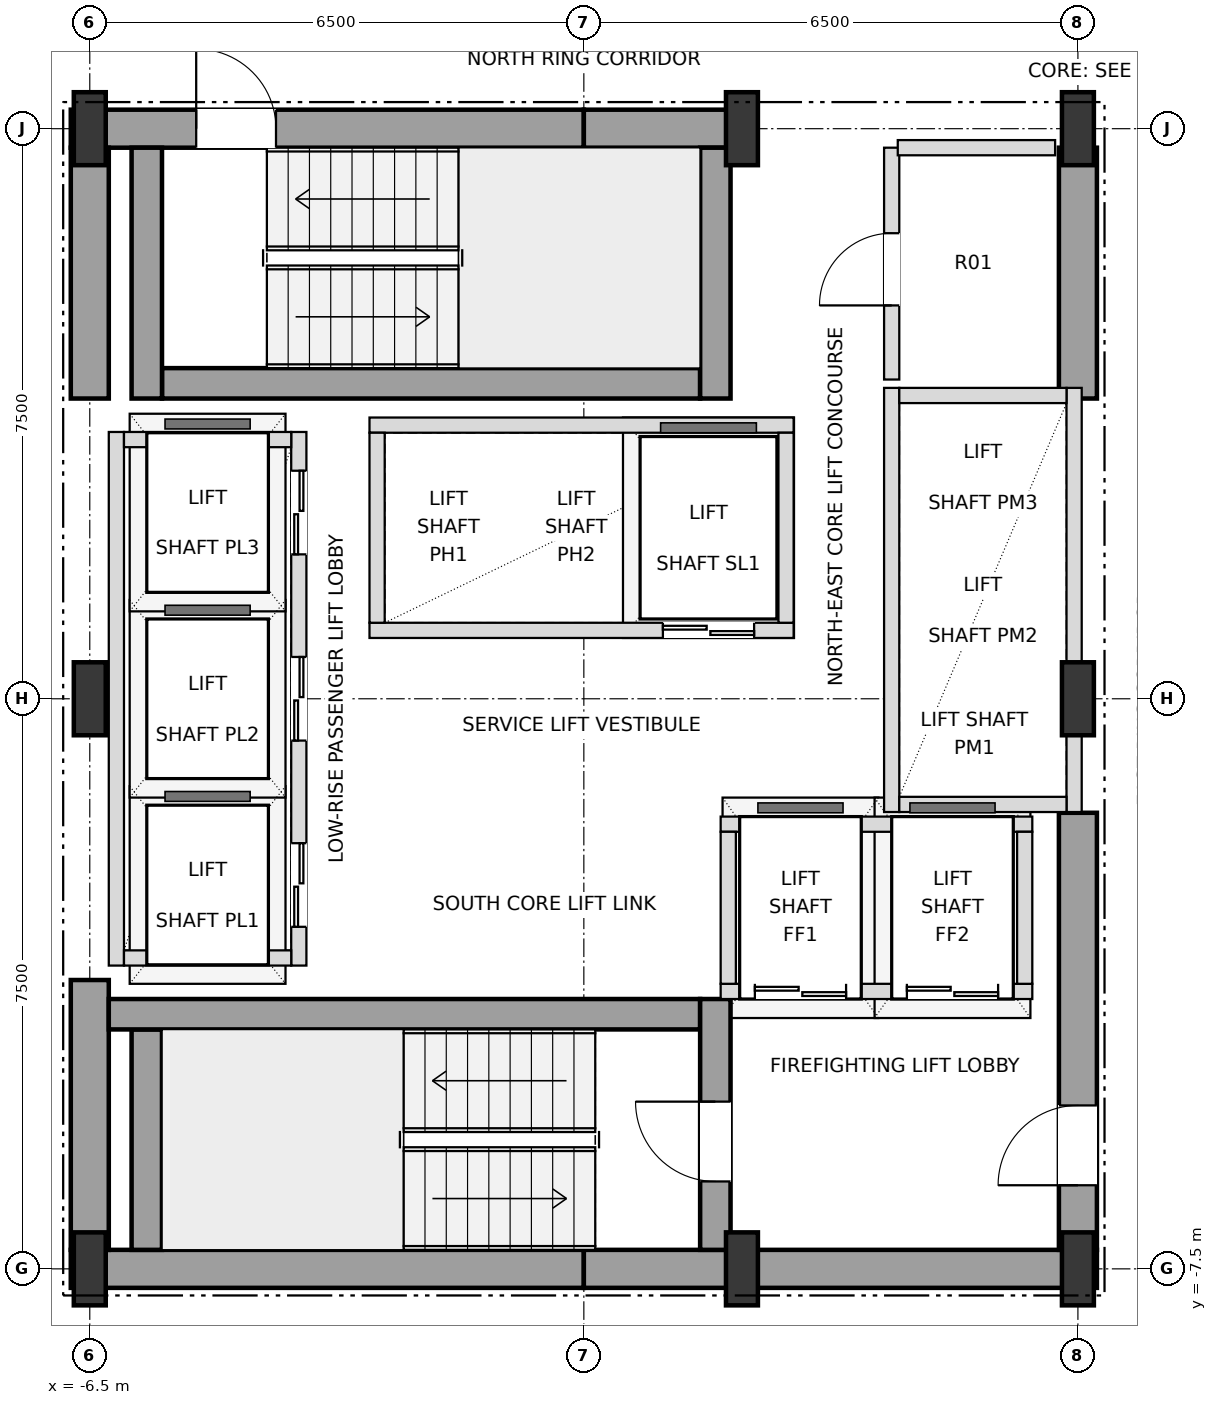
"""IFC4 building model, lengths in metres.
Left out: names, types, materials, properties, quantities, classifications, styles, units other than length and angle.
Written with IfcOpenShell. Run it as: python <this file> out.ifc"""

import sys

from ifc_helpers import new_model, si_unit, direction, frame, frame_2d, origin, origin_2d, place, context, subcontext, project, spatial, rectangle, i_section, extrude, element, fill, save


model = new_model("IFC4")
c1 = context("Model", 3, precision=1e-05, world=origin(), true_north=direction((0.0, 1.0)))
c2 = subcontext(c1, "Body", "Model", "MODEL_VIEW")
j1 = project(units=[si_unit("LENGTHUNIT", "METRE"), si_unit("PLANEANGLEUNIT", "RADIAN")], contexts=[c1])
p1 = place(None, origin())
s1 = spatial("IfcSite", under=j1, at=p1, CompositionType="ELEMENT")
p2 = place(p1, origin())
s2 = spatial("IfcBuilding", under=s1, at=p2, CompositionType="ELEMENT")
p3 = place(p2, frame((0.0, 0.0, 36.0)))
s3 = spatial("IfcBuildingStorey", under=s2, at=p3, CompositionType="ELEMENT", Elevation=36.0)
for number, where, z_axis, x_axis in (
    (1, (-6.5, -7.5, 0.0), (0.0, 0.0, 1.0), (1.0, 0.0, 0.0)),
    (2, (2.08, -7.5, 0.0), (0.0, 0.0, 1.0), (1.0, 0.0, 0.0)),
    (3, (6.5, -7.5, 0.0), (0.0, 0.0, 1.0), (1.0, 0.0, 0.0)),
    (4, (-6.5, 0.0, 0.0), (0.0, 0.0, 1.0), (1.0, 0.0, 0.0)),
    (5, (6.5, 0.0, 0.0), (0.0, 0.0, 1.0), (1.0, 0.0, 0.0)),
    (6, (-6.5, 7.5, 0.0), (0.0, 0.0, 1.0), (1.0, 0.0, 0.0)),
    (7, (2.08, 7.5, 0.0), (0.0, 0.0, 1.0), (1.0, 0.0, 0.0)),
    (8, (6.5, 7.5, 0.0), (0.0, 0.0, 1.0), (1.0, 0.0, 0.0)),
):
    element("IfcColumn", number, at=place(p3, frame(where, z_axis=z_axis, x_axis=x_axis)), inside=s3, PredefinedType="COLUMN", context=c2, shape_type="SweptSolid", body=[
        extrude(i_section(OverallWidth=0.42, OverallDepth=0.96, WebThickness=0.022, FlangeThickness=0.034, at=origin_2d()), origin(), (0.0, 0.0, 1.0), 3.6),
    ])
for number, where, z_axis, x_axis in (
    (9, (-6.75, -7.5, 0.0), (0.0, 0.0, 1.0), (1.0, 0.0, 0.0)),
    (10, (0.0, -7.5, 0.0), (0.0, 0.0, 1.0), (1.0, 0.0, 0.0)),
):
    element("IfcWall", number, at=place(p3, frame(where, z_axis=z_axis, x_axis=x_axis)), inside=s3, PredefinedType="SHEAR", context=c2, shape_type="SweptSolid", body=[
        extrude(rectangle(XDim=6.75, YDim=0.5, at=frame_2d((3.375, 0.0))), origin(), (0.0, 0.0, 1.0), 3.38),
    ])
p4 = place(p3, frame((-6.75, 7.5, 0.0), z_axis=(0.0, 0.0, 1.0), x_axis=(1.0, 0.0, 0.0)))
e11 = element("IfcWall", 11, at=p4, inside=s3, PredefinedType="SHEAR", context=c2, shape_type="SweptSolid", body=[
    extrude(rectangle(XDim=6.75, YDim=0.5, at=frame_2d((3.375, 0.0))), origin(), (0.0, 0.0, 1.0), 3.38),
])
p5 = place(p4, frame((1.65, 0.0, 0.0)))
e12 = element("IfcOpeningElement", 12, at=p5, cuts=e11, PredefinedType="OPENING", context=c2, shape_type="SweptSolid", body=[
    extrude(rectangle(XDim=1.05, YDim=2.15, at=frame_2d((0.525, 1.075))), frame((0.0, 0.26, 0.0), z_axis=(0.0, -1.0, 0.0), x_axis=(1.0, 0.0, 0.0)), (0.0, 0.0, 1.0), 0.52),
])
p6 = place(p3, frame((0.0, 7.5, 0.0), z_axis=(0.0, 0.0, 1.0), x_axis=(1.0, 0.0, 0.0)))
e13 = element("IfcWall", 13, at=p6, inside=s3, PredefinedType="SHEAR", context=c2, shape_type="SweptSolid", body=[
    extrude(rectangle(XDim=2.08, YDim=0.5, at=frame_2d((1.04, 0.0))), origin(), (0.0, 0.0, 1.0), 3.38),
])
p7 = place(p3, frame((-6.5, -7.25, 0.0), z_axis=(0.0, 0.0, 1.0), x_axis=(0.0, 1.0, 0.0)))
e14 = element("IfcWall", 14, at=p7, inside=s3, PredefinedType="SHEAR", context=c2, shape_type="SweptSolid", body=[
    extrude(rectangle(XDim=3.55, YDim=0.5, at=frame_2d((1.775, 0.0))), origin(), (0.0, 0.0, 1.0), 3.38),
])
p8 = place(p3, frame((-6.5, 3.95, 0.0), z_axis=(0.0, 0.0, 1.0), x_axis=(0.0, 1.0, 0.0)))
e15 = element("IfcWall", 15, at=p8, inside=s3, PredefinedType="SHEAR", context=c2, shape_type="SweptSolid", body=[
    extrude(rectangle(XDim=3.3, YDim=0.5, at=frame_2d((1.65, 0.0))), origin(), (0.0, 0.0, 1.0), 3.38),
])
p9 = place(p3, frame((6.5, -7.25, 0.0), z_axis=(0.0, 0.0, 1.0), x_axis=(0.0, 1.0, 0.0)))
e16 = element("IfcWall", 16, at=p9, inside=s3, PredefinedType="SHEAR", context=c2, shape_type="SweptSolid", body=[
    extrude(rectangle(XDim=5.75, YDim=0.5, at=frame_2d((2.875, 0.0))), origin(), (0.0, 0.0, 1.0), 3.38),
])
p10 = place(p9, frame((0.85, 0.0, 0.0)))
e17 = element("IfcOpeningElement", 17, at=p10, cuts=e16, PredefinedType="OPENING", context=c2, shape_type="SweptSolid", body=[
    extrude(rectangle(XDim=1.05, YDim=2.15, at=frame_2d((0.525, 1.075))), frame((0.0, 0.26, 0.0), z_axis=(0.0, -1.0, 0.0), x_axis=(1.0, 0.0, 0.0)), (0.0, 0.0, 1.0), 0.52),
])
p11 = place(p3, frame((6.5, 3.95, 0.0), z_axis=(0.0, 0.0, 1.0), x_axis=(0.0, 1.0, 0.0)))
e18 = element("IfcWall", 18, at=p11, inside=s3, PredefinedType="SHEAR", context=c2, shape_type="SweptSolid", body=[
    extrude(rectangle(XDim=3.3, YDim=0.5, at=frame_2d((1.65, 0.0))), origin(), (0.0, 0.0, 1.0), 3.38),
])
p12 = place(p3, frame((-5.75, -7.25, 0.0), z_axis=(0.0, 0.0, 1.0), x_axis=(0.0, 1.0, 0.0)))
e19 = element("IfcWall", 19, at=p12, inside=s3, PredefinedType="SHEAR", context=c2, shape_type="SweptSolid", body=[
    extrude(rectangle(XDim=2.9, YDim=0.4, at=frame_2d((1.45, 0.0))), origin(), (0.0, 0.0, 1.0), 3.38),
])
p13 = place(p3, frame((-6.25, -4.15, 0.0), z_axis=(0.0, 0.0, 1.0), x_axis=(1.0, 0.0, 0.0)))
e20 = element("IfcWall", 20, at=p13, inside=s3, PredefinedType="SHEAR", context=c2, shape_type="SweptSolid", body=[
    extrude(rectangle(XDim=7.78, YDim=0.4, at=frame_2d((3.89, 0.0))), origin(), (0.0, 0.0, 1.0), 3.38),
])
p14 = place(p3, frame((1.73, -7.25, 0.0), z_axis=(0.0, 0.0, 1.0), x_axis=(0.0, 1.0, 0.0)))
e21 = element("IfcWall", 21, at=p14, inside=s3, PredefinedType="SHEAR", context=c2, shape_type="SweptSolid", body=[
    extrude(rectangle(XDim=3.3, YDim=0.4, at=frame_2d((1.65, 0.0))), origin(), (0.0, 0.0, 1.0), 3.38),
])
p15 = place(p14, frame((0.9, 0.0, 0.0)))
e22 = element("IfcOpeningElement", 22, at=p15, cuts=e21, PredefinedType="OPENING", context=c2, shape_type="SweptSolid", body=[
    extrude(rectangle(XDim=1.05, YDim=2.15, at=frame_2d((0.525, 1.075))), frame((0.0, 0.21, 0.0), z_axis=(0.0, -1.0, 0.0), x_axis=(1.0, 0.0, 0.0)), (0.0, 0.0, 1.0), 0.42),
])
p16 = place(p3, frame((-5.55, 4.15, 0.0), z_axis=(0.0, 0.0, 1.0), x_axis=(1.0, 0.0, 0.0)))
e23 = element("IfcWall", 23, at=p16, inside=s3, PredefinedType="SHEAR", context=c2, shape_type="SweptSolid", body=[
    extrude(rectangle(XDim=7.08, YDim=0.4, at=frame_2d((3.54, 0.0))), origin(), (0.0, 0.0, 1.0), 3.38),
])
for number, where, z_axis, x_axis in (
    (24, (1.73, 3.95, 0.0), (0.0, 0.0, 1.0), (0.0, 1.0, 0.0)),
    (25, (-5.75, 3.95, 0.0), (0.0, 0.0, 1.0), (0.0, 1.0, 0.0)),
):
    element("IfcWall", number, at=place(p3, frame(where, z_axis=z_axis, x_axis=x_axis)), inside=s3, PredefinedType="SHEAR", context=c2, shape_type="SweptSolid", body=[
        extrude(rectangle(XDim=3.3, YDim=0.4, at=frame_2d((1.65, 0.0))), origin(), (0.0, 0.0, 1.0), 3.38),
    ])
p17 = place(p3, frame((-3.75, -3.51, 0.0), z_axis=(0.0, 0.0, 1.0), x_axis=(0.0, 1.0, 0.0)))
e26 = element("IfcWall", 26, at=p17, inside=s3, PredefinedType="SOLIDWALL", context=c2, shape_type="SweptSolid", body=[
    extrude(rectangle(XDim=7.02, YDim=0.2, at=frame_2d((3.51, 0.0))), origin(), (0.0, 0.0, 1.0), 3.38),
])
p18 = place(p17, frame((0.51, 0.0, 0.0)))
e27 = element("IfcOpeningElement", 27, at=p18, cuts=e26, PredefinedType="OPENING", context=c2, shape_type="SweptSolid", body=[
    extrude(rectangle(XDim=1.1, YDim=2.15, at=frame_2d((0.55, 1.075))), frame((0.0, 0.11, 0.0), z_axis=(0.0, -1.0, 0.0), x_axis=(1.0, 0.0, 0.0)), (0.0, 0.0, 1.0), 0.22),
])
p19 = place(p17, frame((2.96, 0.0, 0.0)))
e28 = element("IfcOpeningElement", 28, at=p19, cuts=e26, PredefinedType="OPENING", context=c2, shape_type="SweptSolid", body=[
    extrude(rectangle(XDim=1.1, YDim=2.15, at=frame_2d((0.55, 1.075))), frame((0.0, 0.11, 0.0), z_axis=(0.0, -1.0, 0.0), x_axis=(1.0, 0.0, 0.0)), (0.0, 0.0, 1.0), 0.22),
])
p20 = place(p17, frame((5.41, 0.0, 0.0)))
e29 = element("IfcOpeningElement", 29, at=p20, cuts=e26, PredefinedType="OPENING", context=c2, shape_type="SweptSolid", body=[
    extrude(rectangle(XDim=1.1, YDim=2.15, at=frame_2d((0.55, 1.075))), frame((0.0, 0.11, 0.0), z_axis=(0.0, -1.0, 0.0), x_axis=(1.0, 0.0, 0.0)), (0.0, 0.0, 1.0), 0.22),
])
p21 = place(p3, frame((-6.15, -3.51, 0.0), z_axis=(0.0, 0.0, 1.0), x_axis=(0.0, 1.0, 0.0)))
e30 = element("IfcWall", 30, at=p21, inside=s3, PredefinedType="SOLIDWALL", context=c2, shape_type="SweptSolid", body=[
    extrude(rectangle(XDim=7.02, YDim=0.2, at=frame_2d((3.51, 0.0))), origin(), (0.0, 0.0, 1.0), 3.38),
])
for number, where, z_axis, x_axis in (
    (31, (-6.05, -3.41, 0.0), (0.0, 0.0, 1.0), (1.0, 0.0, 0.0)),
    (32, (-6.05, 3.41, 0.0), (0.0, 0.0, 1.0), (1.0, 0.0, 0.0)),
):
    element("IfcWall", number, at=place(p3, frame(where, z_axis=z_axis, x_axis=x_axis)), inside=s3, PredefinedType="SOLIDWALL", context=c2, shape_type="SweptSolid", body=[
        extrude(rectangle(XDim=2.2, YDim=0.2, at=frame_2d((1.1, 0.0))), origin(), (0.0, 0.0, 1.0), 3.38),
    ])
p22 = place(p3, frame((4.05, -1.49, 0.0), z_axis=(0.0, 0.0, 1.0), x_axis=(0.0, 1.0, 0.0)))
e33 = element("IfcWall", 33, at=p22, inside=s3, PredefinedType="SOLIDWALL", context=c2, shape_type="SweptSolid", body=[
    extrude(rectangle(XDim=5.58, YDim=0.2, at=frame_2d((2.79, 0.0))), origin(), (0.0, 0.0, 1.0), 3.38),
])
p23 = place(p3, frame((6.45, -1.49, 0.0), z_axis=(0.0, 0.0, 1.0), x_axis=(0.0, 1.0, 0.0)))
e34 = element("IfcWall", 34, at=p23, inside=s3, PredefinedType="SOLIDWALL", context=c2, shape_type="SweptSolid", body=[
    extrude(rectangle(XDim=5.58, YDim=0.2, at=frame_2d((2.79, 0.0))), origin(), (0.0, 0.0, 1.0), 2.816),
])
for number, where, z_axis, x_axis in (
    (35, (4.15, -1.39, 0.0), (0.0, 0.0, 1.0), (1.0, 0.0, 0.0)),
    (36, (4.15, 3.99, 0.0), (0.0, 0.0, 1.0), (1.0, 0.0, 0.0)),
):
    element("IfcWall", number, at=place(p3, frame(where, z_axis=z_axis, x_axis=x_axis)), inside=s3, PredefinedType="SOLIDWALL", context=c2, shape_type="SweptSolid", body=[
        extrude(rectangle(XDim=2.2, YDim=0.2, at=frame_2d((1.1, 0.0))), origin(), (0.0, 0.0, 1.0), 3.38),
    ])
p24 = place(p3, frame((-2.82, 0.9, 0.0), z_axis=(0.0, 0.0, 1.0), x_axis=(1.0, 0.0, 0.0)))
e37 = element("IfcWall", 37, at=p24, inside=s3, PredefinedType="SOLIDWALL", context=c2, shape_type="SweptSolid", body=[
    extrude(rectangle(XDim=5.58, YDim=0.2, at=frame_2d((2.79, 0.0))), origin(), (0.0, 0.0, 1.0), 3.38),
])
p25 = place(p24, frame((3.86, 0.0, 0.0)))
e38 = element("IfcOpeningElement", 38, at=p25, cuts=e37, PredefinedType="OPENING", context=c2, shape_type="SweptSolid", body=[
    extrude(rectangle(XDim=1.2, YDim=2.2, at=frame_2d((0.6, 1.1))), frame((0.0, 0.11, 0.0), z_axis=(0.0, -1.0, 0.0), x_axis=(1.0, 0.0, 0.0)), (0.0, 0.0, 1.0), 0.22),
])
p26 = place(p3, frame((-2.82, 3.6, 0.0), z_axis=(0.0, 0.0, 1.0), x_axis=(1.0, 0.0, 0.0)))
e39 = element("IfcWall", 39, at=p26, inside=s3, PredefinedType="SOLIDWALL", context=c2, shape_type="SweptSolid", body=[
    extrude(rectangle(XDim=5.58, YDim=0.2, at=frame_2d((2.79, 0.0))), origin(), (0.0, 0.0, 1.0), 3.38),
])
for number, where, z_axis, x_axis in (
    (40, (-2.72, 1.0, 0.0), (0.0, 0.0, 1.0), (0.0, 1.0, 0.0)),
    (41, (2.66, 1.0, 0.0), (0.0, 0.0, 1.0), (0.0, 1.0, 0.0)),
):
    element("IfcWall", number, at=place(p3, frame(where, z_axis=z_axis, x_axis=x_axis)), inside=s3, PredefinedType="SOLIDWALL", context=c2, shape_type="SweptSolid", body=[
        extrude(rectangle(XDim=2.5, YDim=0.2, at=frame_2d((1.25, 0.0))), origin(), (0.0, 0.0, 1.0), 3.38),
    ])
p27 = place(p3, frame((1.8, -3.85, 0.0), z_axis=(0.0, 0.0, 1.0), x_axis=(1.0, 0.0, 0.0)))
e42 = element("IfcWall", 42, at=p27, inside=s3, PredefinedType="SOLIDWALL", context=c2, shape_type="SweptSolid", body=[
    extrude(rectangle(XDim=4.1, YDim=0.2, at=frame_2d((2.05, 0.0))), origin(), (0.0, 0.0, 1.0), 3.38),
])
p28 = place(p27, frame((0.45, 0.0, 0.0)))
e43 = element("IfcOpeningElement", 43, at=p28, cuts=e42, PredefinedType="OPENING", context=c2, shape_type="SweptSolid", body=[
    extrude(rectangle(XDim=1.2, YDim=2.2, at=frame_2d((0.6, 1.1))), frame((0.0, 0.11, 0.0), z_axis=(0.0, -1.0, 0.0), x_axis=(1.0, 0.0, 0.0)), (0.0, 0.0, 1.0), 0.22),
])
p29 = place(p27, frame((2.45, 0.0, 0.0)))
e44 = element("IfcOpeningElement", 44, at=p29, cuts=e42, PredefinedType="OPENING", context=c2, shape_type="SweptSolid", body=[
    extrude(rectangle(XDim=1.2, YDim=2.2, at=frame_2d((0.6, 1.1))), frame((0.0, 0.11, 0.0), z_axis=(0.0, -1.0, 0.0), x_axis=(1.0, 0.0, 0.0)), (0.0, 0.0, 1.0), 0.22),
])
p30 = place(p3, frame((1.8, -1.65, 0.0), z_axis=(0.0, 0.0, 1.0), x_axis=(1.0, 0.0, 0.0)))
e45 = element("IfcWall", 45, at=p30, inside=s3, PredefinedType="SOLIDWALL", context=c2, shape_type="SweptSolid", body=[
    extrude(rectangle(XDim=4.1, YDim=0.2, at=frame_2d((2.05, 0.0))), origin(), (0.0, 0.0, 1.0), 3.38),
])
for number, where, z_axis, x_axis in (
    (46, (1.9, -3.75, 0.0), (0.0, 0.0, 1.0), (0.0, 1.0, 0.0)),
    (47, (5.8, -3.75, 0.0), (0.0, 0.0, 1.0), (0.0, 1.0, 0.0)),
):
    element("IfcWall", number, at=place(p3, frame(where, z_axis=z_axis, x_axis=x_axis)), inside=s3, PredefinedType="SOLIDWALL", context=c2, shape_type="SweptSolid", body=[
        extrude(rectangle(XDim=2.0, YDim=0.2, at=frame_2d((1.0, 0.0))), origin(), (0.0, 0.0, 1.0), 3.38),
    ])
p31 = place(p3, frame((4.05, 4.2, 0.0), z_axis=(0.0, 0.0, 1.0), x_axis=(0.0, 1.0, 0.0)))
e48 = element("IfcWall", 48, at=p31, inside=s3, PredefinedType="SOLIDWALL", context=c2, shape_type="SweptSolid", body=[
    extrude(rectangle(XDim=3.05, YDim=0.2, at=frame_2d((1.525, 0.0))), origin(), (0.0, 0.0, 1.0), 3.38),
])
p32 = place(p31, frame((0.975, 0.0, 0.0)))
e49 = element("IfcOpeningElement", 49, at=p32, cuts=e48, PredefinedType="OPENING", context=c2, shape_type="SweptSolid", body=[
    extrude(rectangle(XDim=0.95, YDim=2.15, at=frame_2d((0.475, 1.075))), frame((0.0, 0.11, 0.0), z_axis=(0.0, -1.0, 0.0), x_axis=(1.0, 0.0, 0.0)), (0.0, 0.0, 1.0), 0.22),
])
p33 = place(p3, frame((4.13, 7.25, 0.0), z_axis=(0.0, 0.0, 1.0), x_axis=(1.0, 0.0, 0.0)))
e50 = element("IfcWall", 50, at=p33, inside=s3, PredefinedType="SOLIDWALL", context=c2, shape_type="SweptSolid", body=[
    extrude(rectangle(XDim=2.07, YDim=0.2, at=frame_2d((1.035, 0.0))), origin(), (0.0, 0.0, 1.0), 3.38),
])
p34 = place(p10, origin())
e51 = element("IfcDoor", 51, at=p34, inside=s3, OperationType="SINGLE_SWING_LEFT", PredefinedType="DOOR", context=c2, shape_type="SweptSolid", body=[
    extrude(rectangle(XDim=1.05, YDim=2.15, at=frame_2d((0.525, 1.075))), frame((0.0, 0.025, 0.0), z_axis=(0.0, -1.0, 0.0), x_axis=(1.0, 0.0, 0.0)), (0.0, 0.0, 1.0), 0.05),
])
fill(e17, e51)
p35 = place(p15, origin())
e52 = element("IfcDoor", 52, at=p35, inside=s3, OperationType="SINGLE_SWING_RIGHT", PredefinedType="DOOR", context=c2, shape_type="SweptSolid", body=[
    extrude(rectangle(XDim=1.05, YDim=2.15, at=frame_2d((0.525, 1.075))), frame((0.0, 0.025, 0.0), z_axis=(0.0, -1.0, 0.0), x_axis=(1.0, 0.0, 0.0)), (0.0, 0.0, 1.0), 0.05),
])
fill(e22, e52)
p36 = place(p5, origin())
e53 = element("IfcDoor", 53, at=p36, inside=s3, OperationType="SINGLE_SWING_LEFT", PredefinedType="DOOR", context=c2, shape_type="SweptSolid", body=[
    extrude(rectangle(XDim=1.05, YDim=2.15, at=frame_2d((0.525, 1.075))), frame((0.0, 0.025, 0.0), z_axis=(0.0, -1.0, 0.0), x_axis=(1.0, 0.0, 0.0)), (0.0, 0.0, 1.0), 0.05),
])
fill(e12, e53)
p37 = place(p18, origin())
e54 = element("IfcDoor", 54, at=p37, inside=s3, OperationType="DOUBLE_DOOR_SLIDING", PredefinedType="DOOR", context=c2, shape_type="SweptSolid", body=[
    extrude(rectangle(XDim=1.1, YDim=2.15, at=frame_2d((0.55, 1.075))), frame((0.0, 0.025, 0.0), z_axis=(0.0, -1.0, 0.0), x_axis=(1.0, 0.0, 0.0)), (0.0, 0.0, 1.0), 0.05),
])
fill(e27, e54)
p38 = place(p19, origin())
e55 = element("IfcDoor", 55, at=p38, inside=s3, OperationType="DOUBLE_DOOR_SLIDING", PredefinedType="DOOR", context=c2, shape_type="SweptSolid", body=[
    extrude(rectangle(XDim=1.1, YDim=2.15, at=frame_2d((0.55, 1.075))), frame((0.0, 0.025, 0.0), z_axis=(0.0, -1.0, 0.0), x_axis=(1.0, 0.0, 0.0)), (0.0, 0.0, 1.0), 0.05),
])
fill(e28, e55)
p39 = place(p20, origin())
e56 = element("IfcDoor", 56, at=p39, inside=s3, OperationType="DOUBLE_DOOR_SLIDING", PredefinedType="DOOR", context=c2, shape_type="SweptSolid", body=[
    extrude(rectangle(XDim=1.1, YDim=2.15, at=frame_2d((0.55, 1.075))), frame((0.0, 0.025, 0.0), z_axis=(0.0, -1.0, 0.0), x_axis=(1.0, 0.0, 0.0)), (0.0, 0.0, 1.0), 0.05),
])
fill(e29, e56)
p40 = place(p25, origin())
e57 = element("IfcDoor", 57, at=p40, inside=s3, OperationType="DOUBLE_DOOR_SLIDING", PredefinedType="DOOR", context=c2, shape_type="SweptSolid", body=[
    extrude(rectangle(XDim=1.2, YDim=2.2, at=frame_2d((0.6, 1.1))), frame((0.0, 0.025, 0.0), z_axis=(0.0, -1.0, 0.0), x_axis=(1.0, 0.0, 0.0)), (0.0, 0.0, 1.0), 0.05),
])
fill(e38, e57)
p41 = place(p28, origin())
e58 = element("IfcDoor", 58, at=p41, inside=s3, OperationType="DOUBLE_DOOR_SLIDING", PredefinedType="DOOR", context=c2, shape_type="SweptSolid", body=[
    extrude(rectangle(XDim=1.2, YDim=2.2, at=frame_2d((0.6, 1.1))), frame((0.0, 0.025, 0.0), z_axis=(0.0, -1.0, 0.0), x_axis=(1.0, 0.0, 0.0)), (0.0, 0.0, 1.0), 0.05),
])
fill(e43, e58)
p42 = place(p29, origin())
e59 = element("IfcDoor", 59, at=p42, inside=s3, OperationType="DOUBLE_DOOR_SLIDING", PredefinedType="DOOR", context=c2, shape_type="SweptSolid", body=[
    extrude(rectangle(XDim=1.2, YDim=2.2, at=frame_2d((0.6, 1.1))), frame((0.0, 0.025, 0.0), z_axis=(0.0, -1.0, 0.0), x_axis=(1.0, 0.0, 0.0)), (0.0, 0.0, 1.0), 0.05),
])
fill(e44, e59)
p43 = place(p32, origin())
e60 = element("IfcDoor", 60, at=p43, inside=s3, OperationType="SINGLE_SWING_LEFT", PredefinedType="DOOR", context=c2, shape_type="SweptSolid", body=[
    extrude(rectangle(XDim=0.95, YDim=2.15, at=frame_2d((0.475, 1.075))), frame((0.0, 0.025, 0.0), z_axis=(0.0, -1.0, 0.0), x_axis=(1.0, 0.0, 0.0)), (0.0, 0.0, 1.0), 0.05),
])
fill(e49, e60)
save(model, sys.argv[1])
